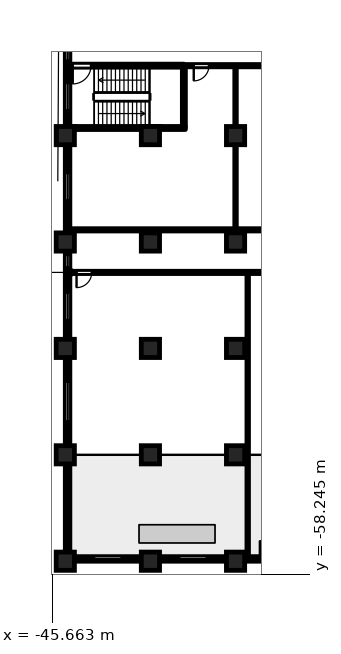
"""IFC4 building model, lengths in metres.
Left out: names, types, materials, properties, quantities, classifications, styles, units other than length and angle.
Written with IfcOpenShell. Run it as: python <this file> out.ifc"""

import sys

from ifc_helpers import new_model, si_unit, direction, frame, frame_2d, origin, origin_2d, place, context, subcontext, project, spatial, rectangle, circle, extrude, element, fill, save


model = new_model("IFC4")
c1 = context("Model", 3, precision=1e-05, world=origin(), true_north=direction((0.0, 1.0)))
c2 = subcontext(c1, "Body", "Model", "MODEL_VIEW")
j1 = project(units=[si_unit("LENGTHUNIT", "METRE"), si_unit("PLANEANGLEUNIT", "RADIAN")], contexts=[c1])
p1 = place(None, origin())
s1 = spatial("IfcSite", under=j1, at=p1, CompositionType="ELEMENT")
p2 = place(p1, origin())
s2 = spatial("IfcBuilding", under=s1, at=p2, CompositionType="ELEMENT")
p3 = place(p2, frame((0.0, 0.0, 6.5)))
s3 = spatial("IfcBuildingStorey", under=s2, at=p3, CompositionType="ELEMENT", Elevation=6.5)
for number, where, z_axis, x_axis in (
    (1, (-44.8, -29.4, 0.0), (0.0, 0.0, 1.0), (1.0, 0.0, 0.0)),
    (2, (-39.2, -29.4, 0.0), (0.0, 0.0, 1.0), (1.0, 0.0, 0.0)),
    (3, (-33.6, -29.4, 0.0), (0.0, 0.0, 1.0), (1.0, 0.0, 0.0)),
    (4, (-44.8, -36.4, 0.0), (0.0, 0.0, 1.0), (1.0, 0.0, 0.0)),
    (5, (-39.2, -36.4, 0.0), (0.0, 0.0, 1.0), (1.0, 0.0, 0.0)),
    (6, (-33.6, -36.4, 0.0), (0.0, 0.0, 1.0), (1.0, 0.0, 0.0)),
    (7, (-44.8, -43.4, 0.0), (0.0, 0.0, 1.0), (1.0, 0.0, 0.0)),
    (8, (-39.2, -43.4, 0.0), (0.0, 0.0, 1.0), (1.0, 0.0, 0.0)),
    (9, (-33.6, -43.4, 0.0), (0.0, 0.0, 1.0), (1.0, 0.0, 0.0)),
    (10, (-44.8, -50.4, 0.0), (0.0, 0.0, 1.0), (1.0, 0.0, 0.0)),
    (11, (-39.2, -50.4, 0.0), (0.0, 0.0, 1.0), (1.0, 0.0, 0.0)),
    (12, (-33.6, -50.4, 0.0), (0.0, 0.0, 1.0), (1.0, 0.0, 0.0)),
    (13, (-44.8, -57.4, 0.0), (0.0, 0.0, 1.0), (1.0, 0.0, 0.0)),
    (14, (-39.2, -57.4, 0.0), (0.0, 0.0, 1.0), (1.0, 0.0, 0.0)),
    (15, (-33.6, -57.4, 0.0), (0.0, 0.0, 1.0), (1.0, 0.0, 0.0)),
):
    element("IfcColumn", number, at=place(p3, frame(where, z_axis=z_axis, x_axis=x_axis)), inside=s3, PredefinedType="COLUMN", context=c2, shape_type="SweptSolid", body=[
        extrude(circle(Radius=0.6, at=origin_2d()), origin(), (0.0, 0.0, 1.0), 4.8),
    ])
p4 = place(p3, frame((-44.65, -23.0, 0.0), z_axis=(0.0, 0.0, 1.0), x_axis=(0.0, -1.0, 0.0)))
e16 = element("IfcWall", 16, at=p4, inside=s3, PredefinedType="SOLIDWALL", context=c2, shape_type="SweptSolid", body=[
    extrude(rectangle(XDim=5.8, YDim=0.3, at=frame_2d((2.9, 0.0))), origin(), (0.0, 0.0, 1.0), 3.65),
])
p5 = place(p4, frame((0.262, 0.0, 0.6)))
e17 = element("IfcOpeningElement", 17, at=p5, cuts=e16, PredefinedType="OPENING", context=c2, shape_type="SweptSolid", body=[
    extrude(rectangle(XDim=1.2, YDim=1.55, at=frame_2d((0.6, 0.775))), frame((0.0, 0.16, 0.0), z_axis=(0.0, -1.0, 0.0), x_axis=(1.0, 0.0, 0.0)), (0.0, 0.0, 1.0), 0.32),
])
p6 = place(p4, frame((2.938, 0.0, 0.9)))
e18 = element("IfcOpeningElement", 18, at=p6, cuts=e16, PredefinedType="OPENING", context=c2, shape_type="SweptSolid", body=[
    extrude(rectangle(XDim=1.8, YDim=1.25, at=frame_2d((0.9, 0.625))), frame((0.0, 0.16, 0.0), z_axis=(0.0, -1.0, 0.0), x_axis=(1.0, 0.0, 0.0)), (0.0, 0.0, 1.0), 0.32),
])
p7 = place(p3, frame((-44.65, -30.0, 0.0), z_axis=(0.0, 0.0, 1.0), x_axis=(0.0, -1.0, 0.0)))
e19 = element("IfcWall", 19, at=p7, inside=s3, PredefinedType="SOLIDWALL", context=c2, shape_type="SweptSolid", body=[
    extrude(rectangle(XDim=5.8, YDim=0.3, at=frame_2d((2.9, 0.0))), origin(), (0.0, 0.0, 1.0), 3.65),
])
p8 = place(p7, frame((1.863, 0.0, 0.9)))
e20 = element("IfcOpeningElement", 20, at=p8, cuts=e19, PredefinedType="OPENING", context=c2, shape_type="SweptSolid", body=[
    extrude(rectangle(XDim=1.8, YDim=1.25, at=frame_2d((0.9, 0.625))), frame((0.0, 0.16, 0.0), z_axis=(0.0, -1.0, 0.0), x_axis=(1.0, 0.0, 0.0)), (0.0, 0.0, 1.0), 0.32),
])
p9 = place(p3, frame((-44.65, -37.0, 0.0), z_axis=(0.0, 0.0, 1.0), x_axis=(0.0, -1.0, 0.0)))
e21 = element("IfcWall", 21, at=p9, inside=s3, PredefinedType="SOLIDWALL", context=c2, shape_type="SweptSolid", body=[
    extrude(rectangle(XDim=5.8, YDim=0.3, at=frame_2d((2.9, 0.0))), origin(), (0.0, 0.0, 1.0), 3.65),
])
p10 = place(p9, frame((0.262, 0.0, 0.6)))
e22 = element("IfcOpeningElement", 22, at=p10, cuts=e21, PredefinedType="OPENING", context=c2, shape_type="SweptSolid", body=[
    extrude(rectangle(XDim=0.8, YDim=1.55, at=frame_2d((0.4, 0.775))), frame((0.0, 0.16, 0.0), z_axis=(0.0, -1.0, 0.0), x_axis=(1.0, 0.0, 0.0)), (0.0, 0.0, 1.0), 0.32),
])
p11 = place(p9, frame((2.738, 0.0, 0.9)))
e23 = element("IfcOpeningElement", 23, at=p11, cuts=e21, PredefinedType="OPENING", context=c2, shape_type="SweptSolid", body=[
    extrude(rectangle(XDim=1.8, YDim=1.25, at=frame_2d((0.9, 0.625))), frame((0.0, 0.16, 0.0), z_axis=(0.0, -1.0, 0.0), x_axis=(1.0, 0.0, 0.0)), (0.0, 0.0, 1.0), 0.32),
])
p12 = place(p3, frame((-44.65, -44.0, 0.0), z_axis=(0.0, 0.0, 1.0), x_axis=(0.0, -1.0, 0.0)))
e24 = element("IfcWall", 24, at=p12, inside=s3, PredefinedType="SOLIDWALL", context=c2, shape_type="SweptSolid", body=[
    extrude(rectangle(XDim=5.8, YDim=0.3, at=frame_2d((2.9, 0.0))), origin(), (0.0, 0.0, 1.0), 3.65),
])
p13 = place(p12, frame((1.6, 0.0, 0.9)))
e25 = element("IfcOpeningElement", 25, at=p13, cuts=e24, PredefinedType="OPENING", context=c2, shape_type="SweptSolid", body=[
    extrude(rectangle(XDim=2.6, YDim=1.25, at=frame_2d((1.3, 0.625))), frame((0.0, 0.16, 0.0), z_axis=(0.0, -1.0, 0.0), x_axis=(1.0, 0.0, 0.0)), (0.0, 0.0, 1.0), 0.32),
])
p14 = place(p3, frame((-44.65, -51.0, 0.0), z_axis=(0.0, 0.0, 1.0), x_axis=(0.0, -1.0, 0.0)))
e26 = element("IfcWall", 26, at=p14, inside=s3, PredefinedType="SOLIDWALL", context=c2, shape_type="SweptSolid", body=[
    extrude(rectangle(XDim=5.8, YDim=0.3, at=frame_2d((2.9, 0.0))), origin(), (0.0, 0.0, 1.0), 3.65),
])
p15 = place(p3, frame((-44.2, -57.25, 0.0), z_axis=(0.0, 0.0, 1.0), x_axis=(1.0, 0.0, 0.0)))
e27 = element("IfcWall", 27, at=p15, inside=s3, PredefinedType="SOLIDWALL", context=c2, shape_type="SweptSolid", body=[
    extrude(rectangle(XDim=4.4, YDim=0.3, at=frame_2d((2.2, 0.0))), origin(), (0.0, 0.0, 1.0), 3.65),
])
p16 = place(p15, frame((1.3, 0.0, 0.9)))
e28 = element("IfcOpeningElement", 28, at=p16, cuts=e27, PredefinedType="OPENING", context=c2, shape_type="SweptSolid", body=[
    extrude(rectangle(XDim=1.8, YDim=1.25, at=frame_2d((0.9, 0.625))), frame((0.0, 0.16, 0.0), z_axis=(0.0, -1.0, 0.0), x_axis=(1.0, 0.0, 0.0)), (0.0, 0.0, 1.0), 0.32),
])
p17 = place(p3, frame((-38.6, -57.25, 0.0), z_axis=(0.0, 0.0, 1.0), x_axis=(1.0, 0.0, 0.0)))
e29 = element("IfcWall", 29, at=p17, inside=s3, PredefinedType="SOLIDWALL", context=c2, shape_type="SweptSolid", body=[
    extrude(rectangle(XDim=4.4, YDim=0.3, at=frame_2d((2.2, 0.0))), origin(), (0.0, 0.0, 1.0), 3.65),
])
p18 = place(p17, frame((1.3, 0.0, 0.9)))
e30 = element("IfcOpeningElement", 30, at=p18, cuts=e29, PredefinedType="OPENING", context=c2, shape_type="SweptSolid", body=[
    extrude(rectangle(XDim=1.8, YDim=1.25, at=frame_2d((0.9, 0.625))), frame((0.0, 0.16, 0.0), z_axis=(0.0, -1.0, 0.0), x_axis=(1.0, 0.0, 0.0)), (0.0, 0.0, 1.0), 0.32),
])
p19 = place(p3, frame((-33.0, -57.25, 0.0), z_axis=(0.0, 0.0, 1.0), x_axis=(1.0, 0.0, 0.0)))
e31 = element("IfcWall", 31, at=p19, inside=s3, PredefinedType="SOLIDWALL", context=c2, shape_type="SweptSolid", body=[
    extrude(rectangle(XDim=4.4, YDim=0.3, at=frame_2d((2.2, 0.0))), origin(), (0.0, 0.0, 1.0), 3.65),
])
p20 = place(p19, frame((1.0, 0.0, 0.0)))
e32 = element("IfcOpeningElement", 32, at=p20, cuts=e31, PredefinedType="OPENING", context=c2, shape_type="SweptSolid", body=[
    extrude(rectangle(XDim=2.4, YDim=2.3, at=frame_2d((1.2, 1.15))), frame((0.0, 0.16, 0.0), z_axis=(0.0, -1.0, 0.0), x_axis=(1.0, 0.0, 0.0)), (0.0, 0.0, 1.0), 0.32),
])
p21 = place(p3, frame((-44.48, -38.4, 0.0), z_axis=(0.0, 0.0, 1.0), x_axis=(1.0, 0.0, 0.0)))
e33 = element("IfcWall", 33, at=p21, inside=s3, PredefinedType="PARTITIONING", context=c2, shape_type="SweptSolid", body=[
    extrude(rectangle(XDim=88.96, YDim=0.15, at=frame_2d((44.48, 0.0))), origin(), (0.0, 0.0, 1.0), 4.45),
])
p22 = place(p21, frame((0.42, 0.0, 0.0)))
e34 = element("IfcOpeningElement", 34, at=p22, cuts=e33, PredefinedType="OPENING", context=c2, shape_type="SweptSolid", body=[
    extrude(rectangle(XDim=1.0, YDim=2.1, at=frame_2d((0.5, 1.05))), frame((0.0, 0.085, 0.0), z_axis=(0.0, -1.0, 0.0), x_axis=(1.0, 0.0, 0.0)), (0.0, 0.0, 1.0), 0.17),
])
p23 = place(p21, frame((18.08, 0.0, 0.0)))
e35 = element("IfcOpeningElement", 35, at=p23, cuts=e33, PredefinedType="OPENING", context=c2, shape_type="SweptSolid", body=[
    extrude(rectangle(XDim=1.0, YDim=2.1, at=frame_2d((0.5, 1.05))), frame((0.0, 0.085, 0.0), z_axis=(0.0, -1.0, 0.0), x_axis=(1.0, 0.0, 0.0)), (0.0, 0.0, 1.0), 0.17),
])
p24 = place(p21, frame((20.33, 0.0, 0.0)))
e36 = element("IfcOpeningElement", 36, at=p24, cuts=e33, PredefinedType="OPENING", context=c2, shape_type="SweptSolid", body=[
    extrude(rectangle(XDim=1.0, YDim=2.1, at=frame_2d((0.5, 1.05))), frame((0.0, 0.085, 0.0), z_axis=(0.0, -1.0, 0.0), x_axis=(1.0, 0.0, 0.0)), (0.0, 0.0, 1.0), 0.17),
])
p25 = place(p21, frame((32.08, 0.0, 0.0)))
e37 = element("IfcOpeningElement", 37, at=p25, cuts=e33, PredefinedType="OPENING", context=c2, shape_type="SweptSolid", body=[
    extrude(rectangle(XDim=1.0, YDim=2.1, at=frame_2d((0.5, 1.05))), frame((0.0, 0.085, 0.0), z_axis=(0.0, -1.0, 0.0), x_axis=(1.0, 0.0, 0.0)), (0.0, 0.0, 1.0), 0.17),
])
p26 = place(p21, frame((34.33, 0.0, 0.0)))
e38 = element("IfcOpeningElement", 38, at=p26, cuts=e33, PredefinedType="OPENING", context=c2, shape_type="SweptSolid", body=[
    extrude(rectangle(XDim=1.0, YDim=2.1, at=frame_2d((0.5, 1.05))), frame((0.0, 0.085, 0.0), z_axis=(0.0, -1.0, 0.0), x_axis=(1.0, 0.0, 0.0)), (0.0, 0.0, 1.0), 0.17),
])
p27 = place(p21, frame((52.08, 0.0, 0.0)))
e39 = element("IfcOpeningElement", 39, at=p27, cuts=e33, PredefinedType="OPENING", context=c2, shape_type="SweptSolid", body=[
    extrude(rectangle(XDim=1.0, YDim=2.1, at=frame_2d((0.5, 1.05))), frame((0.0, 0.085, 0.0), z_axis=(0.0, -1.0, 0.0), x_axis=(1.0, 0.0, 0.0)), (0.0, 0.0, 1.0), 0.17),
])
p28 = place(p21, frame((54.33, 0.0, 0.0)))
e40 = element("IfcOpeningElement", 40, at=p28, cuts=e33, PredefinedType="OPENING", context=c2, shape_type="SweptSolid", body=[
    extrude(rectangle(XDim=0.9, YDim=2.1, at=frame_2d((0.45, 1.05))), frame((0.0, 0.085, 0.0), z_axis=(0.0, -1.0, 0.0), x_axis=(1.0, 0.0, 0.0)), (0.0, 0.0, 1.0), 0.17),
])
p29 = place(p21, frame((87.58, 0.0, 0.0)))
e41 = element("IfcOpeningElement", 41, at=p29, cuts=e33, PredefinedType="OPENING", context=c2, shape_type="SweptSolid", body=[
    extrude(rectangle(XDim=1.0, YDim=2.1, at=frame_2d((0.5, 1.05))), frame((0.0, 0.085, 0.0), z_axis=(0.0, -1.0, 0.0), x_axis=(1.0, 0.0, 0.0)), (0.0, 0.0, 1.0), 0.17),
])
p30 = place(p3, frame((-44.48, -35.6, 0.0), z_axis=(0.0, 0.0, 1.0), x_axis=(1.0, 0.0, 0.0)))
e42 = element("IfcWall", 42, at=p30, inside=s3, PredefinedType="PARTITIONING", context=c2, shape_type="SweptSolid", body=[
    extrude(rectangle(XDim=42.38, YDim=0.15, at=frame_2d((21.19, 0.0))), origin(), (0.0, 0.0, 1.0), 4.45),
])
p31 = place(p3, frame((-44.71, -28.9, 0.0), z_axis=(0.0, 0.0, 1.0), x_axis=(1.0, 0.0, 0.0)))
e43 = element("IfcWall", 43, at=p31, inside=s3, PredefinedType="SHEAR", context=c2, shape_type="SweptSolid", body=[
    extrude(rectangle(XDim=7.81, YDim=0.2, at=frame_2d((3.905, 0.0))), origin(), (0.0, 0.0, 1.0), 4.45),
])
p32 = place(p3, frame((-37.0, -24.8, 0.0), z_axis=(0.0, 0.0, 1.0), x_axis=(1.0, 0.0, 0.0)))
e44 = element("IfcWall", 44, at=p32, inside=s3, PredefinedType="PARTITIONING", context=c2, shape_type="SweptSolid", body=[
    extrude(rectangle(XDim=34.9, YDim=0.15, at=frame_2d((17.45, 0.0))), origin(), (0.0, 0.0, 1.0), 4.45),
])
p33 = place(p32, frame((0.65, 0.0, 0.0)))
e45 = element("IfcOpeningElement", 45, at=p33, cuts=e44, PredefinedType="OPENING", context=c2, shape_type="SweptSolid", body=[
    extrude(rectangle(XDim=1.0, YDim=2.1, at=frame_2d((0.5, 1.05))), frame((0.0, 0.085, 0.0), z_axis=(0.0, -1.0, 0.0), x_axis=(1.0, 0.0, 0.0)), (0.0, 0.0, 1.0), 0.17),
])
p34 = place(p32, frame((5.8, 0.0, 0.0)))
e46 = element("IfcOpeningElement", 46, at=p34, cuts=e44, PredefinedType="OPENING", context=c2, shape_type="SweptSolid", body=[
    extrude(rectangle(XDim=1.0, YDim=2.1, at=frame_2d((0.5, 1.05))), frame((0.0, 0.085, 0.0), z_axis=(0.0, -1.0, 0.0), x_axis=(1.0, 0.0, 0.0)), (0.0, 0.0, 1.0), 0.17),
])
p35 = place(p32, frame((8.05, 0.0, 0.0)))
e47 = element("IfcOpeningElement", 47, at=p35, cuts=e44, PredefinedType="OPENING", context=c2, shape_type="SweptSolid", body=[
    extrude(rectangle(XDim=1.0, YDim=2.1, at=frame_2d((0.5, 1.05))), frame((0.0, 0.085, 0.0), z_axis=(0.0, -1.0, 0.0), x_axis=(1.0, 0.0, 0.0)), (0.0, 0.0, 1.0), 0.17),
])
p36 = place(p32, frame((13.8, 0.0, 0.0)))
e48 = element("IfcOpeningElement", 48, at=p36, cuts=e44, PredefinedType="OPENING", context=c2, shape_type="SweptSolid", body=[
    extrude(rectangle(XDim=1.0, YDim=2.1, at=frame_2d((0.5, 1.05))), frame((0.0, 0.085, 0.0), z_axis=(0.0, -1.0, 0.0), x_axis=(1.0, 0.0, 0.0)), (0.0, 0.0, 1.0), 0.17),
])
p37 = place(p32, frame((16.05, 0.0, 0.0)))
e49 = element("IfcOpeningElement", 49, at=p37, cuts=e44, PredefinedType="OPENING", context=c2, shape_type="SweptSolid", body=[
    extrude(rectangle(XDim=1.0, YDim=2.1, at=frame_2d((0.5, 1.05))), frame((0.0, 0.085, 0.0), z_axis=(0.0, -1.0, 0.0), x_axis=(1.0, 0.0, 0.0)), (0.0, 0.0, 1.0), 0.17),
])
p38 = place(p32, frame((33.3, 0.0, 0.0)))
e50 = element("IfcOpeningElement", 50, at=p38, cuts=e44, PredefinedType="OPENING", context=c2, shape_type="SweptSolid", body=[
    extrude(rectangle(XDim=1.0, YDim=2.1, at=frame_2d((0.5, 1.05))), frame((0.0, 0.085, 0.0), z_axis=(0.0, -1.0, 0.0), x_axis=(1.0, 0.0, 0.0)), (0.0, 0.0, 1.0), 0.17),
])
p39 = place(p3, frame((-44.71, -24.8, 0.0), z_axis=(0.0, 0.0, 1.0), x_axis=(1.0, 0.0, 0.0)))
e51 = element("IfcWall", 51, at=p39, inside=s3, PredefinedType="SHEAR", context=c2, shape_type="SweptSolid", body=[
    extrude(rectangle(XDim=7.71, YDim=0.2, at=frame_2d((3.855, 0.0))), origin(), (0.0, 0.0, 1.0), 4.45),
])
p40 = place(p39, frame((0.4, 0.0, 0.0)))
e52 = element("IfcOpeningElement", 52, at=p40, cuts=e51, PredefinedType="OPENING", context=c2, shape_type="SweptSolid", body=[
    extrude(rectangle(XDim=1.2, YDim=2.1, at=frame_2d((0.6, 1.05))), frame((0.0, 0.11, 0.0), z_axis=(0.0, -1.0, 0.0), x_axis=(1.0, 0.0, 0.0)), (0.0, 0.0, 1.0), 0.22),
])
p41 = place(p3, frame((-37.0, -28.8, 0.0), z_axis=(0.0, 0.0, 1.0), x_axis=(0.0, 1.0, 0.0)))
e53 = element("IfcWall", 53, at=p41, inside=s3, PredefinedType="SHEAR", context=c2, shape_type="SweptSolid", body=[
    extrude(rectangle(XDim=3.925, YDim=0.2, at=frame_2d((1.962, 0.0))), origin(), (0.0, 0.0, 1.0), 4.45),
])
p42 = place(p3, frame((-33.6, -35.525, 0.0), z_axis=(0.0, 0.0, 1.0), x_axis=(0.0, 1.0, 0.0)))
e54 = element("IfcWall", 54, at=p42, inside=s3, PredefinedType="PARTITIONING", context=c2, shape_type="SweptSolid", body=[
    extrude(rectangle(XDim=10.65, YDim=0.1, at=frame_2d((5.325, 0.0))), origin(), (0.0, 0.0, 1.0), 4.45),
])
p43 = place(p3, frame((-32.8, -57.08, 0.0), z_axis=(0.0, 0.0, 1.0), x_axis=(0.0, 1.0, 0.0)))
e55 = element("IfcWall", 55, at=p43, inside=s3, PredefinedType="PARTITIONING", context=c2, shape_type="SweptSolid", body=[
    extrude(rectangle(XDim=18.605, YDim=0.1, at=frame_2d((9.302, 0.0))), origin(), (0.0, 0.0, 1.0), 4.45),
])
p44 = place(p20, origin())
e56 = element("IfcDoor", 56, at=p44, inside=s3, OperationType="SINGLE_SWING_LEFT", PredefinedType="DOOR", context=c2, shape_type="SweptSolid", body=[
    extrude(rectangle(XDim=2.4, YDim=2.3, at=frame_2d((1.2, 1.15))), frame((0.0, 0.025, 0.0), z_axis=(0.0, -1.0, 0.0), x_axis=(1.0, 0.0, 0.0)), (0.0, 0.0, 1.0), 0.05),
])
fill(e32, e56)
p45 = place(p40, origin())
e57 = element("IfcDoor", 57, at=p45, inside=s3, OperationType="SINGLE_SWING_LEFT", PredefinedType="DOOR", context=c2, shape_type="SweptSolid", body=[
    extrude(rectangle(XDim=1.2, YDim=2.1, at=frame_2d((0.6, 1.05))), frame((0.0, 0.025, 0.0), z_axis=(0.0, -1.0, 0.0), x_axis=(1.0, 0.0, 0.0)), (0.0, 0.0, 1.0), 0.05),
])
fill(e52, e57)
p46 = place(p33, origin())
e58 = element("IfcDoor", 58, at=p46, inside=s3, OperationType="SINGLE_SWING_LEFT", PredefinedType="DOOR", context=c2, shape_type="SweptSolid", body=[
    extrude(rectangle(XDim=1.0, YDim=2.1, at=frame_2d((0.5, 1.05))), frame((0.0, 0.025, 0.0), z_axis=(0.0, -1.0, 0.0), x_axis=(1.0, 0.0, 0.0)), (0.0, 0.0, 1.0), 0.05),
])
fill(e45, e58)
p47 = place(p22, origin())
e59 = element("IfcDoor", 59, at=p47, inside=s3, OperationType="SINGLE_SWING_LEFT", PredefinedType="DOOR", context=c2, shape_type="SweptSolid", body=[
    extrude(rectangle(XDim=1.0, YDim=2.1, at=frame_2d((0.5, 1.05))), frame((0.0, 0.025, 0.0), z_axis=(0.0, -1.0, 0.0), x_axis=(1.0, 0.0, 0.0)), (0.0, 0.0, 1.0), 0.05),
])
fill(e34, e59)
p48 = place(p5, origin())
e60 = element("IfcWindow", 60, at=p48, inside=s3, PartitioningType="SINGLE_PANEL", PredefinedType="WINDOW", context=c2, shape_type="SweptSolid", body=[
    extrude(rectangle(XDim=1.2, YDim=1.55, at=frame_2d((0.6, 0.775))), frame((0.0, 0.03, 0.0), z_axis=(0.0, -1.0, 0.0), x_axis=(1.0, 0.0, 0.0)), (0.0, 0.0, 1.0), 0.06),
])
fill(e17, e60)
p49 = place(p6, origin())
e61 = element("IfcWindow", 61, at=p49, inside=s3, PartitioningType="SINGLE_PANEL", PredefinedType="WINDOW", context=c2, shape_type="SweptSolid", body=[
    extrude(rectangle(XDim=1.8, YDim=1.25, at=frame_2d((0.9, 0.625))), frame((0.0, 0.03, 0.0), z_axis=(0.0, -1.0, 0.0), x_axis=(1.0, 0.0, 0.0)), (0.0, 0.0, 1.0), 0.06),
])
fill(e18, e61)
p50 = place(p8, origin())
e62 = element("IfcWindow", 62, at=p50, inside=s3, PartitioningType="SINGLE_PANEL", PredefinedType="WINDOW", context=c2, shape_type="SweptSolid", body=[
    extrude(rectangle(XDim=1.8, YDim=1.25, at=frame_2d((0.9, 0.625))), frame((0.0, 0.03, 0.0), z_axis=(0.0, -1.0, 0.0), x_axis=(1.0, 0.0, 0.0)), (0.0, 0.0, 1.0), 0.06),
])
fill(e20, e62)
p51 = place(p10, origin())
e63 = element("IfcWindow", 63, at=p51, inside=s3, PartitioningType="SINGLE_PANEL", PredefinedType="WINDOW", context=c2, shape_type="SweptSolid", body=[
    extrude(rectangle(XDim=0.8, YDim=1.55, at=frame_2d((0.4, 0.775))), frame((0.0, 0.03, 0.0), z_axis=(0.0, -1.0, 0.0), x_axis=(1.0, 0.0, 0.0)), (0.0, 0.0, 1.0), 0.06),
])
fill(e22, e63)
p52 = place(p11, origin())
e64 = element("IfcWindow", 64, at=p52, inside=s3, PartitioningType="SINGLE_PANEL", PredefinedType="WINDOW", context=c2, shape_type="SweptSolid", body=[
    extrude(rectangle(XDim=1.8, YDim=1.25, at=frame_2d((0.9, 0.625))), frame((0.0, 0.03, 0.0), z_axis=(0.0, -1.0, 0.0), x_axis=(1.0, 0.0, 0.0)), (0.0, 0.0, 1.0), 0.06),
])
fill(e23, e64)
p53 = place(p13, origin())
e65 = element("IfcWindow", 65, at=p53, inside=s3, PartitioningType="SINGLE_PANEL", PredefinedType="WINDOW", context=c2, shape_type="SweptSolid", body=[
    extrude(rectangle(XDim=2.6, YDim=1.25, at=frame_2d((1.3, 0.625))), frame((0.0, 0.03, 0.0), z_axis=(0.0, -1.0, 0.0), x_axis=(1.0, 0.0, 0.0)), (0.0, 0.0, 1.0), 0.06),
])
fill(e25, e65)
p54 = place(p16, origin())
e66 = element("IfcWindow", 66, at=p54, inside=s3, PartitioningType="SINGLE_PANEL", PredefinedType="WINDOW", context=c2, shape_type="SweptSolid", body=[
    extrude(rectangle(XDim=1.8, YDim=1.25, at=frame_2d((0.9, 0.625))), frame((0.0, 0.03, 0.0), z_axis=(0.0, -1.0, 0.0), x_axis=(1.0, 0.0, 0.0)), (0.0, 0.0, 1.0), 0.06),
])
fill(e28, e66)
p55 = place(p18, origin())
e67 = element("IfcWindow", 67, at=p55, inside=s3, PartitioningType="SINGLE_PANEL", PredefinedType="WINDOW", context=c2, shape_type="SweptSolid", body=[
    extrude(rectangle(XDim=1.8, YDim=1.25, at=frame_2d((0.9, 0.625))), frame((0.0, 0.03, 0.0), z_axis=(0.0, -1.0, 0.0), x_axis=(1.0, 0.0, 0.0)), (0.0, 0.0, 1.0), 0.06),
])
fill(e30, e67)
save(model, sys.argv[1])
